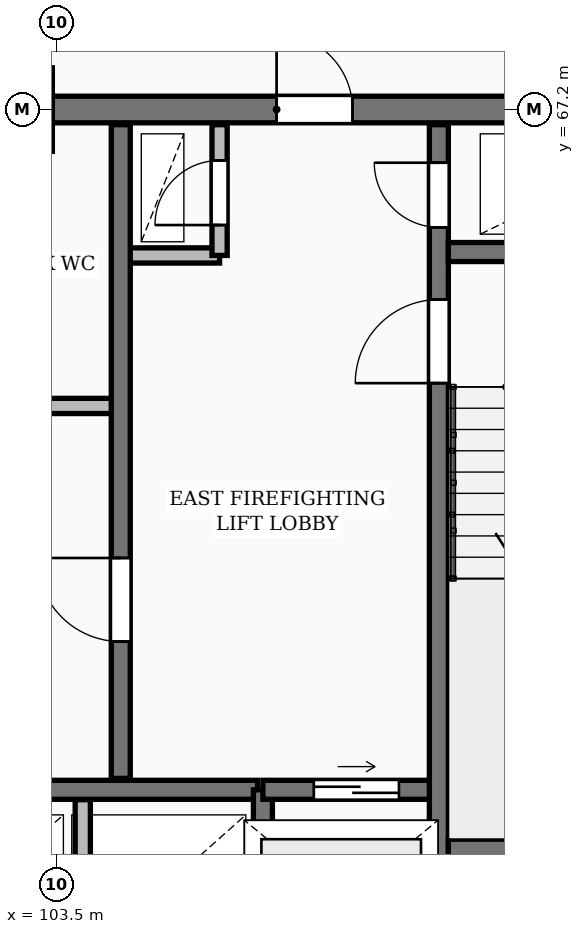
"""IFC4 building model, lengths in metres.
Left out: names, types, materials, properties, quantities, classifications, styles, units other than length and angle.
Written with IfcOpenShell. Run it as: python <this file> out.ifc"""

import sys

from ifc_helpers import new_model, si_unit, direction, frame, frame_2d, origin, place, context, subcontext, project, spatial, rectangle, extrude, element, fill, save


model = new_model("IFC4")
c1 = context("Model", 3, precision=1e-05, world=origin(), true_north=direction((0.0, 1.0)))
c2 = subcontext(c1, "Body", "Model", "MODEL_VIEW")
j1 = project(units=[si_unit("LENGTHUNIT", "METRE"), si_unit("PLANEANGLEUNIT", "RADIAN")], contexts=[c1])
p1 = place(None, origin())
s1 = spatial("IfcSite", under=j1, at=p1, CompositionType="ELEMENT")
p2 = place(p1, origin())
s2 = spatial("IfcBuilding", under=s1, at=p2, CompositionType="ELEMENT")
p3 = place(p2, frame((0.0, 0.0, -3.6)))
s3 = spatial("IfcBuildingStorey", under=s2, at=p3, CompositionType="ELEMENT", Elevation=-3.6)
p4 = place(p3, frame((75.95, 67.2, 0.0), z_axis=(0.0, 0.0, 1.0), x_axis=(1.0, 0.0, 0.0)))
e1 = element("IfcWall", 1, at=p4, inside=s3, PredefinedType="SHEAR", context=c2, shape_type="SweptSolid", body=[
    extrude(rectangle(XDim=36.3, YDim=0.35, at=frame_2d((18.15, 0.0))), origin(), (0.0, 0.0, 1.0), 3.6),
])
p5 = place(p4, frame((5.25, 0.0, 0.0)))
e2 = element("IfcOpeningElement", 2, at=p5, cuts=e1, PredefinedType="OPENING", context=c2, shape_type="SweptSolid", body=[
    extrude(rectangle(XDim=1.0, YDim=2.15, at=frame_2d((0.5, 1.075))), frame((0.0, 0.185, 0.0), z_axis=(0.0, -1.0, 0.0), x_axis=(1.0, 0.0, 0.0)), (0.0, 0.0, 1.0), 0.37),
])
p6 = place(p4, frame((21.6, 0.0, 0.0)))
e3 = element("IfcOpeningElement", 3, at=p6, cuts=e1, PredefinedType="OPENING", context=c2, shape_type="SweptSolid", body=[
    extrude(rectangle(XDim=1.5, YDim=2.2, at=frame_2d((0.75, 1.1))), frame((0.0, 0.185, 0.0), z_axis=(0.0, -1.0, 0.0), x_axis=(1.0, 0.0, 0.0)), (0.0, 0.0, 1.0), 0.37),
])
p7 = place(p4, frame((30.45, 0.0, 0.0)))
e4 = element("IfcOpeningElement", 4, at=p7, cuts=e1, PredefinedType="OPENING", context=c2, shape_type="SweptSolid", body=[
    extrude(rectangle(XDim=1.0, YDim=2.15, at=frame_2d((0.5, 1.075))), frame((0.0, 0.185, 0.0), z_axis=(0.0, -1.0, 0.0), x_axis=(1.0, 0.0, 0.0)), (0.0, 0.0, 1.0), 0.37),
])
p8 = place(p3, frame((103.85, 55.4, 0.0), z_axis=(0.0, 0.0, 1.0), x_axis=(0.0, 1.0, 0.0)))
e5 = element("IfcWall", 5, at=p8, inside=s3, PredefinedType="PARTITIONING", context=c2, shape_type="SweptSolid", body=[
    extrude(rectangle(XDim=2.72, YDim=0.2, at=frame_2d((1.36, 0.0))), origin(), (0.0, 0.0, 1.0), 3.3),
])
p9 = place(p3, frame((101.55, 58.25, 0.0), z_axis=(0.0, 0.0, 1.0), x_axis=(1.0, 0.0, 0.0)))
e6 = element("IfcWall", 6, at=p9, inside=s3, PredefinedType="SHEAR", context=c2, shape_type="SweptSolid", body=[
    extrude(rectangle(XDim=4.6, YDim=0.25, at=frame_2d((2.3, 0.0))), origin(), (0.0, 0.0, 1.0), 3.6),
])
p10 = place(p3, frame((106.22, 55.4, 0.0), z_axis=(0.0, 0.0, 1.0), x_axis=(0.0, 1.0, 0.0)))
e7 = element("IfcWall", 7, at=p10, inside=s3, PredefinedType="SHEAR", context=c2, shape_type="SweptSolid", body=[
    extrude(rectangle(XDim=2.85, YDim=0.25, at=frame_2d((1.425, 0.0))), origin(), (0.0, 0.0, 1.0), 3.6),
])
p11 = place(p3, frame((106.22, 58.25, 0.0), z_axis=(0.0, 0.0, 1.0), x_axis=(1.0, 0.0, 0.0)))
e8 = element("IfcWall", 8, at=p11, inside=s3, PredefinedType="SHEAR", context=c2, shape_type="SweptSolid", body=[
    extrude(rectangle(XDim=2.46, YDim=0.25, at=frame_2d((1.23, 0.0))), origin(), (0.0, 0.0, 1.0), 3.6),
])
p12 = place(p11, frame((0.67, 0.0, 0.0)))
e9 = element("IfcOpeningElement", 9, at=p12, cuts=e8, PredefinedType="OPENING", context=c2, shape_type="SweptSolid", body=[
    extrude(rectangle(XDim=1.12, YDim=2.12, at=frame_2d((0.56, 1.06))), frame((0.0, 0.135, 0.0), z_axis=(0.0, -1.0, 0.0), x_axis=(1.0, 0.0, 0.0)), (0.0, 0.0, 1.0), 0.27),
])
p13 = place(p3, frame((84.42, 63.3, 0.0), z_axis=(0.0, 0.0, 1.0), x_axis=(1.0, 0.0, 0.0)))
e10 = element("IfcWall", 10, at=p13, inside=s3, PredefinedType="PARTITIONING", context=c2, shape_type="SweptSolid", body=[
    extrude(rectangle(XDim=19.83, YDim=0.2, at=frame_2d((9.915, 0.0))), origin(), (0.0, 0.0, 1.0), 3.3),
])
p14 = place(p13, frame((1.15, 0.0, 0.0)))
e11 = element("IfcOpeningElement", 11, at=p14, cuts=e10, PredefinedType="OPENING", context=c2, shape_type="SweptSolid", body=[
    extrude(rectangle(XDim=0.85, YDim=2.05, at=frame_2d((0.425, 1.025))), frame((0.0, 0.11, 0.0), z_axis=(0.0, -1.0, 0.0), x_axis=(1.0, 0.0, 0.0)), (0.0, 0.0, 1.0), 0.22),
])
p15 = place(p13, frame((3.25, 0.0, 0.0)))
e12 = element("IfcOpeningElement", 12, at=p15, cuts=e10, PredefinedType="OPENING", context=c2, shape_type="SweptSolid", body=[
    extrude(rectangle(XDim=0.85, YDim=2.05, at=frame_2d((0.425, 1.025))), frame((0.0, 0.11, 0.0), z_axis=(0.0, -1.0, 0.0), x_axis=(1.0, 0.0, 0.0)), (0.0, 0.0, 1.0), 0.22),
])
p16 = place(p13, frame((13.08, 0.0, 0.0)))
e13 = element("IfcOpeningElement", 13, at=p16, cuts=e10, PredefinedType="OPENING", context=c2, shape_type="SweptSolid", body=[
    extrude(rectangle(XDim=1.5, YDim=2.2, at=frame_2d((0.75, 1.1))), frame((0.0, 0.11, 0.0), z_axis=(0.0, -1.0, 0.0), x_axis=(1.0, 0.0, 0.0)), (0.0, 0.0, 1.0), 0.22),
])
p17 = place(p13, frame((6.68, 0.0, 0.0)))
e14 = element("IfcOpeningElement", 14, at=p17, cuts=e10, PredefinedType="OPENING", context=c2, shape_type="SweptSolid", body=[
    extrude(rectangle(XDim=0.92, YDim=2.08, at=frame_2d((0.46, 1.04))), frame((0.0, 0.11, 0.0), z_axis=(0.0, -1.0, 0.0), x_axis=(1.0, 0.0, 0.0)), (0.0, 0.0, 1.0), 0.22),
])
p18 = place(p13, frame((16.33, 0.0, 0.0)))
e15 = element("IfcOpeningElement", 15, at=p18, cuts=e10, PredefinedType="OPENING", context=c2, shape_type="SweptSolid", body=[
    extrude(rectangle(XDim=0.88, YDim=2.06, at=frame_2d((0.44, 1.03))), frame((0.0, 0.11, 0.0), z_axis=(0.0, -1.0, 0.0), x_axis=(1.0, 0.0, 0.0)), (0.0, 0.0, 1.0), 0.22),
])
p19 = place(p3, frame((104.45, 65.28, 0.0), z_axis=(0.0, 0.0, 1.0), x_axis=(1.0, 0.0, 0.0)))
e16 = element("IfcWall", 16, at=p19, inside=s3, PredefinedType="PARTITIONING", context=c2, shape_type="SweptSolid", body=[
    extrude(rectangle(XDim=1.2, YDim=0.2, at=frame_2d((0.6, 0.0))), origin(), (0.0, 0.0, 1.0), 3.3),
])
p20 = place(p3, frame((105.65, 65.28, 0.0), z_axis=(0.0, 0.0, 1.0), x_axis=(0.0, 1.0, 0.0)))
e17 = element("IfcWall", 17, at=p20, inside=s3, PredefinedType="PARTITIONING", context=c2, shape_type="SweptSolid", body=[
    extrude(rectangle(XDim=1.72, YDim=0.2, at=frame_2d((0.86, 0.0))), origin(), (0.0, 0.0, 1.0), 3.3),
])
p21 = place(p20, frame((0.4, 0.0, 0.0)))
e18 = element("IfcOpeningElement", 18, at=p21, cuts=e17, PredefinedType="OPENING", context=c2, shape_type="SweptSolid", body=[
    extrude(rectangle(XDim=0.85, YDim=2.05, at=frame_2d((0.425, 1.025))), frame((0.0, 0.11, 0.0), z_axis=(0.0, -1.0, 0.0), x_axis=(1.0, 0.0, 0.0)), (0.0, 0.0, 1.0), 0.22),
])
p22 = place(p3, frame((104.35, 58.4, 0.0), z_axis=(0.0, 0.0, 1.0), x_axis=(0.0, 1.0, 0.0)))
e19 = element("IfcWall", 19, at=p22, inside=s3, PredefinedType="SHEAR", context=c2, shape_type="SweptSolid", body=[
    extrude(rectangle(XDim=8.6, YDim=0.25, at=frame_2d((4.3, 0.0))), origin(), (0.0, 0.0, 1.0), 3.6),
])
p23 = place(p22, frame((1.8, 0.0, 0.0)))
e20 = element("IfcOpeningElement", 20, at=p23, cuts=e19, PredefinedType="OPENING", context=c2, shape_type="SweptSolid", body=[
    extrude(rectangle(XDim=1.1, YDim=2.1, at=frame_2d((0.55, 1.05))), frame((0.0, 0.135, 0.0), z_axis=(0.0, -1.0, 0.0), x_axis=(1.0, 0.0, 0.0)), (0.0, 0.0, 1.0), 0.27),
])
p24 = place(p3, frame((108.535, 55.4, 0.0), z_axis=(0.0, 0.0, 1.0), x_axis=(0.0, 1.0, 0.0)))
e21 = element("IfcWall", 21, at=p24, inside=s3, PredefinedType="SHEAR", context=c2, shape_type="SweptSolid", body=[
    extrude(rectangle(XDim=11.6, YDim=0.25, at=frame_2d((5.8, 0.0))), origin(), (0.0, 0.0, 1.0), 3.6),
])
p25 = place(p24, frame((8.2, 0.0, 0.0)))
e22 = element("IfcOpeningElement", 22, at=p25, cuts=e21, PredefinedType="OPENING", context=c2, shape_type="SweptSolid", body=[
    extrude(rectangle(XDim=1.1, YDim=2.1, at=frame_2d((0.55, 1.05))), frame((0.0, 0.135, 0.0), z_axis=(0.0, -1.0, 0.0), x_axis=(1.0, 0.0, 0.0)), (0.0, 0.0, 1.0), 0.27),
])
p26 = place(p24, frame((10.25, 0.0, 0.0)))
e23 = element("IfcOpeningElement", 23, at=p26, cuts=e21, PredefinedType="OPENING", context=c2, shape_type="SweptSolid", body=[
    extrude(rectangle(XDim=0.85, YDim=2.05, at=frame_2d((0.425, 1.025))), frame((0.0, 0.135, 0.0), z_axis=(0.0, -1.0, 0.0), x_axis=(1.0, 0.0, 0.0)), (0.0, 0.0, 1.0), 0.27),
])
for number, where, z_axis, x_axis in (
    (24, (108.66, 57.475, 0.0), (0.0, 0.0, 1.0), (1.0, 0.0, 0.0)),
    (25, (108.66, 65.325, 0.0), (0.0, 0.0, 1.0), (1.0, 0.0, 0.0)),
):
    element("IfcWall", number, at=place(p3, frame(where, z_axis=z_axis, x_axis=x_axis)), inside=s3, PredefinedType="SHEAR", context=c2, shape_type="SweptSolid", body=[
        extrude(rectangle(XDim=3.24, YDim=0.25, at=frame_2d((1.62, 0.0))), origin(), (0.0, 0.0, 1.0), 3.6),
    ])
p27 = place(p7, origin())
e26 = element("IfcDoor", 26, at=p27, inside=s3, OperationType="SINGLE_SWING_LEFT", PredefinedType="DOOR", context=c2, shape_type="SweptSolid", body=[
    extrude(rectangle(XDim=1.0, YDim=2.15, at=frame_2d((0.5, 1.075))), frame((0.0, 0.025, 0.0), z_axis=(0.0, -1.0, 0.0), x_axis=(1.0, 0.0, 0.0)), (0.0, 0.0, 1.0), 0.05),
])
fill(e4, e26)
p28 = place(p12, origin())
e27 = element("IfcDoor", 27, at=p28, inside=s3, OperationType="SLIDING_TO_RIGHT", PredefinedType="DOOR", context=c2, shape_type="SweptSolid", body=[
    extrude(rectangle(XDim=1.12, YDim=2.12, at=frame_2d((0.56, 1.06))), frame((0.0, 0.025, 0.0), z_axis=(0.0, -1.0, 0.0), x_axis=(1.0, 0.0, 0.0)), (0.0, 0.0, 1.0), 0.05),
])
fill(e9, e27)
p29 = place(p21, origin())
e28 = element("IfcDoor", 28, at=p29, inside=s3, OperationType="SINGLE_SWING_LEFT", PredefinedType="DOOR", context=c2, shape_type="SweptSolid", body=[
    extrude(rectangle(XDim=0.85, YDim=2.05, at=frame_2d((0.425, 1.025))), frame((0.0, 0.025, 0.0), z_axis=(0.0, -1.0, 0.0), x_axis=(1.0, 0.0, 0.0)), (0.0, 0.0, 1.0), 0.05),
])
fill(e18, e28)
p30 = place(p23, origin())
e29 = element("IfcDoor", 29, at=p30, inside=s3, OperationType="SINGLE_SWING_RIGHT", PredefinedType="DOOR", context=c2, shape_type="SweptSolid", body=[
    extrude(rectangle(XDim=1.1, YDim=2.1, at=frame_2d((0.55, 1.05))), frame((0.0, 0.025, 0.0), z_axis=(0.0, -1.0, 0.0), x_axis=(1.0, 0.0, 0.0)), (0.0, 0.0, 1.0), 0.05),
])
fill(e20, e29)
p31 = place(p25, origin())
e30 = element("IfcDoor", 30, at=p31, inside=s3, OperationType="SINGLE_SWING_LEFT", PredefinedType="DOOR", context=c2, shape_type="SweptSolid", body=[
    extrude(rectangle(XDim=1.1, YDim=2.1, at=frame_2d((0.55, 1.05))), frame((0.0, 0.025, 0.0), z_axis=(0.0, -1.0, 0.0), x_axis=(1.0, 0.0, 0.0)), (0.0, 0.0, 1.0), 0.05),
])
fill(e22, e30)
p32 = place(p26, origin())
e31 = element("IfcDoor", 31, at=p32, inside=s3, OperationType="SINGLE_SWING_RIGHT", PredefinedType="DOOR", context=c2, shape_type="SweptSolid", body=[
    extrude(rectangle(XDim=0.85, YDim=2.05, at=frame_2d((0.425, 1.025))), frame((0.0, 0.025, 0.0), z_axis=(0.0, -1.0, 0.0), x_axis=(1.0, 0.0, 0.0)), (0.0, 0.0, 1.0), 0.05),
])
fill(e23, e31)
save(model, sys.argv[1])
